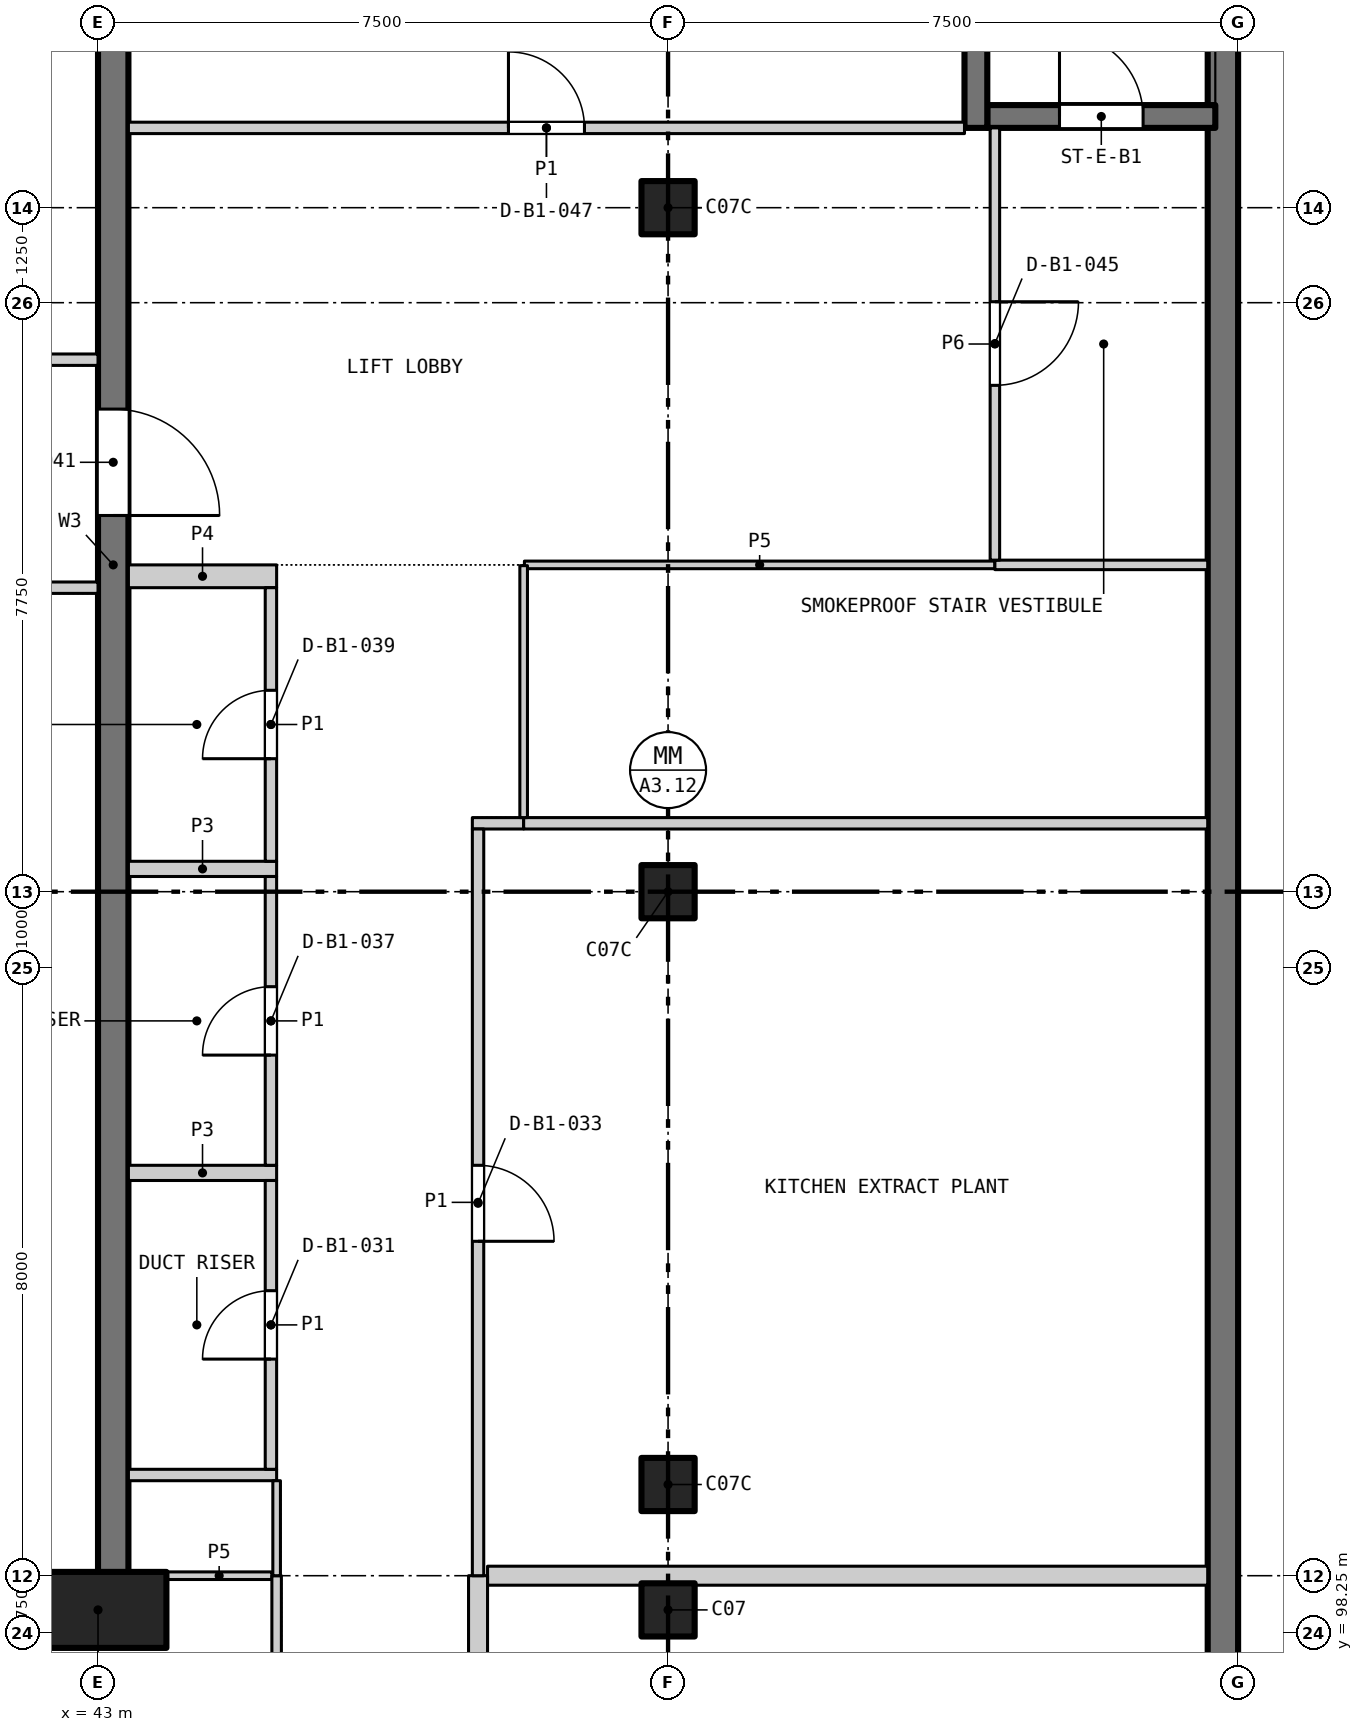
"""IFC4 building model, lengths in metres.
Left out: names, types, materials, properties, quantities, classifications, styles, units other than length and angle.
Written with IfcOpenShell. Run it as: python <this file> out.ifc"""

import sys

from ifc_helpers import new_model, si_unit, direction, frame, frame_2d, origin, origin_2d, place, context, subcontext, project, spatial, rectangle, extrude, element, fill, save


model = new_model("IFC4")
c1 = context("Model", 3, precision=1e-05, world=origin(), true_north=direction((0.0, 1.0)))
c2 = subcontext(c1, "Body", "Model", "MODEL_VIEW")
j1 = project(units=[si_unit("LENGTHUNIT", "METRE"), si_unit("PLANEANGLEUNIT", "RADIAN")], contexts=[c1])
p1 = place(None, origin())
s1 = spatial("IfcSite", under=j1, at=p1, CompositionType="ELEMENT")
p2 = place(p1, origin())
s2 = spatial("IfcBuilding", under=s1, at=p2, CompositionType="ELEMENT")
p3 = place(p2, frame((0.0, 0.0, -10.0)))
s3 = spatial("IfcBuildingStorey", under=s2, at=p3, CompositionType="ELEMENT", Elevation=-10.0)
for number, where, z_axis, x_axis in (
    (1, (50.5, 98.55, -1.4), (0.0, 0.0, 1.0), (1.0, 0.0, 0.0)),
    (2, (50.5, 100.2, -1.4), (0.0, 0.0, 1.0), (1.0, 0.0, 0.0)),
    (3, (50.5, 108.0, -1.4), (0.0, 0.0, 1.0), (1.0, 0.0, 0.0)),
    (4, (50.5, 117.0, -1.4), (0.0, 0.0, 1.0), (1.0, 0.0, 0.0)),
):
    element("IfcColumn", number, at=place(p3, frame(where, z_axis=z_axis, x_axis=x_axis)), inside=s3, PredefinedType="COLUMN", context=c2, shape_type="SweptSolid", body=[
        extrude(rectangle(XDim=0.7, YDim=0.7, at=origin_2d()), origin(), (0.0, 0.0, 1.0), 6.4),
    ])
p4 = place(p3, frame((57.8, 18.0, -1.4), z_axis=(0.0, 0.0, 1.0), x_axis=(0.0, 1.0, 0.0)))
e5 = element("IfcWall", 5, at=p4, inside=s3, PredefinedType="SOLIDWALL", context=c2, shape_type="SweptSolid", body=[
    extrude(rectangle(XDim=108.0, YDim=0.4, at=frame_2d((54.0, 0.0))), origin(), (0.0, 0.0, 1.0), 6.4),
])
p5 = place(p3, frame((43.2, 99.0, -1.4), z_axis=(0.0, 0.0, 1.0), x_axis=(0.0, 1.0, 0.0)))
e6 = element("IfcWall", 6, at=p5, inside=s3, PredefinedType="SHEAR", context=c2, shape_type="SweptSolid", body=[
    extrude(rectangle(XDim=26.6, YDim=0.4, at=frame_2d((13.3, 0.0))), origin(), (0.0, 0.0, 1.0), 6.4),
])
p6 = place(p5, frame((13.95, 0.0, 1.4)))
e7 = element("IfcOpeningElement", 7, at=p6, cuts=e6, PredefinedType="OPENING", context=c2, shape_type="SweptSolid", body=[
    extrude(rectangle(XDim=1.4, YDim=2.4, at=frame_2d((0.7, 1.2))), frame((0.0, 0.21, 0.0), z_axis=(0.0, -1.0, 0.0), x_axis=(1.0, 0.0, 0.0)), (0.0, 0.0, 1.0), 0.42),
])
p7 = place(p3, frame((54.7, 118.2, 0.0), z_axis=(0.0, 0.0, 1.0), x_axis=(1.0, 0.0, 0.0)))
e8 = element("IfcWall", 8, at=p7, inside=s3, PredefinedType="SHEAR", context=c2, shape_type="SweptSolid", body=[
    extrude(rectangle(XDim=3.0, YDim=0.3, at=frame_2d((1.5, 0.0))), origin(), (0.0, 0.0, 1.0), 5.0),
])
p8 = place(p7, frame((0.95, 0.0, 0.0)))
e9 = element("IfcOpeningElement", 9, at=p8, cuts=e8, PredefinedType="OPENING", context=c2, shape_type="SweptSolid", body=[
    extrude(rectangle(XDim=1.1, YDim=2.1, at=frame_2d((0.55, 1.05))), frame((0.0, 0.16, 0.0), z_axis=(0.0, -1.0, 0.0), x_axis=(1.0, 0.0, 0.0)), (0.0, 0.0, 1.0), 0.32),
])
p9 = place(p3, frame((54.55, 118.05, 0.0), z_axis=(0.0, 0.0, 1.0), x_axis=(0.0, 1.0, 0.0)))
e10 = element("IfcWall", 10, at=p9, inside=s3, PredefinedType="SHEAR", context=c2, shape_type="SweptSolid", body=[
    extrude(rectangle(XDim=7.5, YDim=0.3, at=frame_2d((3.75, 0.0))), origin(), (0.0, 0.0, 1.0), 5.0),
])
p10 = place(p3, frame((43.0, 98.55, -1.4), z_axis=(0.0, 0.0, 1.0), x_axis=(1.0, 0.0, 0.0)))
e11 = element("IfcColumn", 11, at=p10, inside=s3, PredefinedType="COLUMN", context=c2, shape_type="SweptSolid", body=[
    extrude(rectangle(XDim=1.8, YDim=1.0, at=origin_2d()), origin(), (0.0, 0.0, 1.0), 6.4),
])
p11 = place(p3, frame((43.4, 100.325, 0.0), z_axis=(0.0, 0.0, 1.0), x_axis=(1.0, 0.0, 0.0)))
e12 = element("IfcWall", 12, at=p11, inside=s3, PredefinedType="PARTITIONING", context=c2, shape_type="SweptSolid", body=[
    extrude(rectangle(XDim=1.95, YDim=0.15, at=frame_2d((0.975, 0.0))), origin(), (0.0, 0.0, 1.0), 4.75),
])
for number, where, z_axis, x_axis in (
    (13, (43.4, 104.3, 0.0), (0.0, 0.0, 1.0), (1.0, 0.0, 0.0)),
    (14, (43.4, 108.3, 0.0), (0.0, 0.0, 1.0), (1.0, 0.0, 0.0)),
):
    element("IfcWall", number, at=place(p3, frame(where, z_axis=z_axis, x_axis=x_axis)), inside=s3, PredefinedType="PARTITIONING", context=c2, shape_type="SweptSolid", body=[
        extrude(rectangle(XDim=1.95, YDim=0.2, at=frame_2d((0.975, 0.0))), origin(), (0.0, 0.0, 1.0), 4.75),
    ])
p12 = place(p3, frame((43.4, 112.15, 0.0), z_axis=(0.0, 0.0, 1.0), x_axis=(1.0, 0.0, 0.0)))
e15 = element("IfcWall", 15, at=p12, inside=s3, PredefinedType="PARTITIONING", context=c2, shape_type="SweptSolid", body=[
    extrude(rectangle(XDim=1.95, YDim=0.3, at=frame_2d((0.975, 0.0))), origin(), (0.0, 0.0, 1.0), 4.75),
])
p13 = place(p3, frame((45.275, 100.4, 0.0), z_axis=(0.0, 0.0, 1.0), x_axis=(0.0, 1.0, 0.0)))
e16 = element("IfcWall", 16, at=p13, inside=s3, PredefinedType="PARTITIONING", context=c2, shape_type="SweptSolid", body=[
    extrude(rectangle(XDim=3.8, YDim=0.15, at=frame_2d((1.9, 0.0))), origin(), (0.0, 0.0, 1.0), 4.75),
])
p14 = place(p13, frame((1.45, 0.0, 0.0)))
e17 = element("IfcOpeningElement", 17, at=p14, cuts=e16, PredefinedType="OPENING", context=c2, shape_type="SweptSolid", body=[
    extrude(rectangle(XDim=0.9, YDim=2.1, at=frame_2d((0.45, 1.05))), frame((0.0, 0.085, 0.0), z_axis=(0.0, -1.0, 0.0), x_axis=(1.0, 0.0, 0.0)), (0.0, 0.0, 1.0), 0.17),
])
p15 = place(p3, frame((45.275, 104.4, 0.0), z_axis=(0.0, 0.0, 1.0), x_axis=(0.0, 1.0, 0.0)))
e18 = element("IfcWall", 18, at=p15, inside=s3, PredefinedType="PARTITIONING", context=c2, shape_type="SweptSolid", body=[
    extrude(rectangle(XDim=3.8, YDim=0.15, at=frame_2d((1.9, 0.0))), origin(), (0.0, 0.0, 1.0), 4.75),
])
p16 = place(p15, frame((1.45, 0.0, 0.0)))
e19 = element("IfcOpeningElement", 19, at=p16, cuts=e18, PredefinedType="OPENING", context=c2, shape_type="SweptSolid", body=[
    extrude(rectangle(XDim=0.9, YDim=2.1, at=frame_2d((0.45, 1.05))), frame((0.0, 0.085, 0.0), z_axis=(0.0, -1.0, 0.0), x_axis=(1.0, 0.0, 0.0)), (0.0, 0.0, 1.0), 0.17),
])
p17 = place(p3, frame((45.275, 108.4, 0.0), z_axis=(0.0, 0.0, 1.0), x_axis=(0.0, 1.0, 0.0)))
e20 = element("IfcWall", 20, at=p17, inside=s3, PredefinedType="PARTITIONING", context=c2, shape_type="SweptSolid", body=[
    extrude(rectangle(XDim=3.6, YDim=0.15, at=frame_2d((1.8, 0.0))), origin(), (0.0, 0.0, 1.0), 4.75),
])
p18 = place(p17, frame((1.35, 0.0, 0.0)))
e21 = element("IfcOpeningElement", 21, at=p18, cuts=e20, PredefinedType="OPENING", context=c2, shape_type="SweptSolid", body=[
    extrude(rectangle(XDim=0.9, YDim=2.1, at=frame_2d((0.45, 1.05))), frame((0.0, 0.085, 0.0), z_axis=(0.0, -1.0, 0.0), x_axis=(1.0, 0.0, 0.0)), (0.0, 0.0, 1.0), 0.17),
])
p19 = place(p3, frame((43.9, 99.0, 0.0), z_axis=(0.0, 0.0, 1.0), x_axis=(1.0, 0.0, 0.0)))
e22 = element("IfcWall", 22, at=p19, inside=s3, PredefinedType="PARTITIONING", context=c2, shape_type="SweptSolid", body=[
    extrude(rectangle(XDim=1.388, YDim=0.1, at=frame_2d((0.694, 0.0))), origin(), (0.0, 0.0, 1.0), 4.75),
])
p20 = place(p3, frame((48.125, 99.0, 0.0), z_axis=(0.0, 0.0, 1.0), x_axis=(1.0, 0.0, 0.0)))
e23 = element("IfcWall", 23, at=p20, inside=s3, PredefinedType="PARTITIONING", context=c2, shape_type="SweptSolid", body=[
    extrude(rectangle(XDim=9.475, YDim=0.25, at=frame_2d((4.738, 0.0))), origin(), (0.0, 0.0, 1.0), 4.75),
])
p21 = place(p3, frame((47.925, 108.9, 0.0), z_axis=(0.0, 0.0, 1.0), x_axis=(1.0, 0.0, 0.0)))
e24 = element("IfcWall", 24, at=p21, inside=s3, PredefinedType="PARTITIONING", context=c2, shape_type="SweptSolid", body=[
    extrude(rectangle(XDim=0.675, YDim=0.15, at=frame_2d((0.337, 0.0))), origin(), (0.0, 0.0, 1.0), 4.75),
])
p22 = place(p3, frame((48.6, 108.9, 0.0), z_axis=(0.0, 0.0, 1.0), x_axis=(1.0, 0.0, 0.0)))
e25 = element("IfcWall", 25, at=p22, inside=s3, PredefinedType="PARTITIONING", context=c2, shape_type="SweptSolid", body=[
    extrude(rectangle(XDim=9.0, YDim=0.15, at=frame_2d((4.5, 0.0))), origin(), (0.0, 0.0, 1.0), 4.75),
])
p23 = place(p3, frame((33.51, 112.0, 0.0), z_axis=(0.0, 0.0, 1.0), x_axis=(1.0, 0.0, 0.0)))
e26 = element("IfcWall", 26, at=p23, inside=s3, PredefinedType="PARTITIONING", context=c2, shape_type="SweptSolid", body=[
    extrude(rectangle(XDim=9.49, YDim=0.15, at=frame_2d((4.745, 0.0))), origin(), (0.0, 0.0, 1.0), 4.75),
])
p24 = place(p3, frame((48.61, 112.3, 0.0), z_axis=(0.0, 0.0, 1.0), x_axis=(1.0, 0.0, 0.0)))
e27 = element("IfcWall", 27, at=p24, inside=s3, PredefinedType="PARTITIONING", context=c2, shape_type="SweptSolid", body=[
    extrude(rectangle(XDim=6.19, YDim=0.1, at=frame_2d((3.095, 0.0))), origin(), (0.0, 0.0, 1.0), 4.75),
])
p25 = place(p3, frame((54.8, 112.3, 0.0), z_axis=(0.0, 0.0, 1.0), x_axis=(1.0, 0.0, 0.0)))
e28 = element("IfcWall", 28, at=p25, inside=s3, PredefinedType="PARTITIONING", context=c2, shape_type="SweptSolid", body=[
    extrude(rectangle(XDim=2.8, YDim=0.125, at=frame_2d((1.4, 0.0))), origin(), (0.0, 0.0, 1.0), 4.75),
])
p26 = place(p3, frame((29.0, 115.0, 0.0), z_axis=(0.0, 0.0, 1.0), x_axis=(1.0, 0.0, 0.0)))
e29 = element("IfcWall", 29, at=p26, inside=s3, PredefinedType="PARTITIONING", context=c2, shape_type="SweptSolid", body=[
    extrude(rectangle(XDim=14.0, YDim=0.15, at=frame_2d((7.0, 0.0))), origin(), (0.0, 0.0, 1.0), 4.75),
])
p27 = place(p26, frame((6.0, 0.0, 0.0)))
e30 = element("IfcOpeningElement", 30, at=p27, cuts=e29, PredefinedType="OPENING", context=c2, shape_type="SweptSolid", body=[
    extrude(rectangle(XDim=2.0, YDim=2.4, at=frame_2d((1.0, 1.2))), frame((0.0, 0.085, 0.0), z_axis=(0.0, -1.0, 0.0), x_axis=(1.0, 0.0, 0.0)), (0.0, 0.0, 1.0), 0.17),
])
p28 = place(p3, frame((43.4, 118.05, 0.0), z_axis=(0.0, 0.0, 1.0), x_axis=(1.0, 0.0, 0.0)))
e31 = element("IfcWall", 31, at=p28, inside=s3, PredefinedType="PARTITIONING", context=c2, shape_type="SweptSolid", body=[
    extrude(rectangle(XDim=11.0, YDim=0.15, at=frame_2d((5.5, 0.0))), origin(), (0.0, 0.0, 1.0), 4.75),
])
p29 = place(p28, frame((5.0, 0.0, 0.0)))
e32 = element("IfcOpeningElement", 32, at=p29, cuts=e31, PredefinedType="OPENING", context=c2, shape_type="SweptSolid", body=[
    extrude(rectangle(XDim=1.0, YDim=2.1, at=frame_2d((0.5, 1.05))), frame((0.0, 0.085, 0.0), z_axis=(0.0, -1.0, 0.0), x_axis=(1.0, 0.0, 0.0)), (0.0, 0.0, 1.0), 0.17),
])
p30 = place(p3, frame((45.35, 85.5, 0.0), z_axis=(0.0, 0.0, 1.0), x_axis=(0.0, 1.0, 0.0)))
e33 = element("IfcWall", 33, at=p30, inside=s3, PredefinedType="PARTITIONING", context=c2, shape_type="SweptSolid", body=[
    extrude(rectangle(XDim=13.5, YDim=0.125, at=frame_2d((6.75, 0.0))), origin(), (0.0, 0.0, 1.0), 4.75),
])
p31 = place(p3, frame((45.35, 99.0, 0.0), z_axis=(0.0, 0.0, 1.0), x_axis=(0.0, 1.0, 0.0)))
e34 = element("IfcWall", 34, at=p31, inside=s3, PredefinedType="PARTITIONING", context=c2, shape_type="SweptSolid", body=[
    extrude(rectangle(XDim=1.25, YDim=0.1, at=frame_2d((0.625, 0.0))), origin(), (0.0, 0.0, 1.0), 4.75),
])
p32 = place(p3, frame((48.0, 72.0, 0.0), z_axis=(0.0, 0.0, 1.0), x_axis=(0.0, 1.0, 0.0)))
e35 = element("IfcWall", 35, at=p32, inside=s3, PredefinedType="PARTITIONING", context=c2, shape_type="SweptSolid", body=[
    extrude(rectangle(XDim=27.0, YDim=0.25, at=frame_2d((13.5, 0.0))), origin(), (0.0, 0.0, 1.0), 4.75),
])
p33 = place(p32, frame((12.4, 0.0, 0.0)))
e36 = element("IfcOpeningElement", 36, at=p33, cuts=e35, PredefinedType="OPENING", context=c2, shape_type="SweptSolid", body=[
    extrude(rectangle(XDim=2.2, YDim=2.4, at=frame_2d((1.1, 1.2))), frame((0.0, 0.135, 0.0), z_axis=(0.0, -1.0, 0.0), x_axis=(1.0, 0.0, 0.0)), (0.0, 0.0, 1.0), 0.27),
])
p34 = place(p3, frame((48.0, 99.0, 0.0), z_axis=(0.0, 0.0, 1.0), x_axis=(0.0, 1.0, 0.0)))
e37 = element("IfcWall", 37, at=p34, inside=s3, PredefinedType="PARTITIONING", context=c2, shape_type="SweptSolid", body=[
    extrude(rectangle(XDim=9.825, YDim=0.15, at=frame_2d((4.913, 0.0))), origin(), (0.0, 0.0, 1.0), 4.75),
])
p35 = place(p34, frame((4.4, 0.0, 0.0)))
e38 = element("IfcOpeningElement", 38, at=p35, cuts=e37, PredefinedType="OPENING", context=c2, shape_type="SweptSolid", body=[
    extrude(rectangle(XDim=1.0, YDim=2.1, at=frame_2d((0.5, 1.05))), frame((0.0, 0.085, 0.0), z_axis=(0.0, -1.0, 0.0), x_axis=(1.0, 0.0, 0.0)), (0.0, 0.0, 1.0), 0.17),
])
p36 = place(p3, frame((48.6, 108.975, 0.0), z_axis=(0.0, 0.0, 1.0), x_axis=(0.0, 1.0, 0.0)))
e39 = element("IfcWall", 39, at=p36, inside=s3, PredefinedType="PARTITIONING", context=c2, shape_type="SweptSolid", body=[
    extrude(rectangle(XDim=3.315, YDim=0.1, at=frame_2d((1.657, 0.0))), origin(), (0.0, 0.0, 1.0), 4.75),
])
p37 = place(p3, frame((54.8, 112.363, 0.0), z_axis=(0.0, 0.0, 1.0), x_axis=(0.0, 1.0, 0.0)))
e40 = element("IfcWall", 40, at=p37, inside=s3, PredefinedType="PARTITIONING", context=c2, shape_type="SweptSolid", body=[
    extrude(rectangle(XDim=5.688, YDim=0.125, at=frame_2d((2.844, 0.0))), origin(), (0.0, 0.0, 1.0), 4.75),
])
p38 = place(p37, frame((2.3, 0.0, 0.0)))
e41 = element("IfcOpeningElement", 41, at=p38, cuts=e40, PredefinedType="OPENING", context=c2, shape_type="SweptSolid", body=[
    extrude(rectangle(XDim=1.1, YDim=2.1, at=frame_2d((0.55, 1.05))), frame((0.0, 0.073, 0.0), z_axis=(0.0, -1.0, 0.0), x_axis=(1.0, 0.0, 0.0)), (0.0, 0.0, 1.0), 0.145),
])
p39 = place(p14, origin())
e42 = element("IfcDoor", 42, at=p39, inside=s3, OperationType="SINGLE_SWING_LEFT", PredefinedType="DOOR", context=c2, shape_type="SweptSolid", body=[
    extrude(rectangle(XDim=0.9, YDim=2.1, at=frame_2d((0.45, 1.05))), frame((0.0, 0.025, 0.0), z_axis=(0.0, -1.0, 0.0), x_axis=(1.0, 0.0, 0.0)), (0.0, 0.0, 1.0), 0.05),
])
fill(e17, e42)
p40 = place(p35, frame((1.0, 0.0, 0.0), z_axis=(0.0, 0.0, 1.0), x_axis=(-1.0, 0.0, 0.0)))
e43 = element("IfcDoor", 43, at=p40, inside=s3, OperationType="SINGLE_SWING_RIGHT", PredefinedType="DOOR", context=c2, shape_type="SweptSolid", body=[
    extrude(rectangle(XDim=1.0, YDim=2.1, at=frame_2d((0.5, 1.05))), frame((0.0, 0.025, 0.0), z_axis=(0.0, -1.0, 0.0), x_axis=(1.0, 0.0, 0.0)), (0.0, 0.0, 1.0), 0.05),
])
fill(e38, e43)
p41 = place(p16, origin())
e44 = element("IfcDoor", 44, at=p41, inside=s3, OperationType="SINGLE_SWING_LEFT", PredefinedType="DOOR", context=c2, shape_type="SweptSolid", body=[
    extrude(rectangle(XDim=0.9, YDim=2.1, at=frame_2d((0.45, 1.05))), frame((0.0, 0.025, 0.0), z_axis=(0.0, -1.0, 0.0), x_axis=(1.0, 0.0, 0.0)), (0.0, 0.0, 1.0), 0.05),
])
fill(e19, e44)
p42 = place(p18, origin())
e45 = element("IfcDoor", 45, at=p42, inside=s3, OperationType="SINGLE_SWING_LEFT", PredefinedType="DOOR", context=c2, shape_type="SweptSolid", body=[
    extrude(rectangle(XDim=0.9, YDim=2.1, at=frame_2d((0.45, 1.05))), frame((0.0, 0.025, 0.0), z_axis=(0.0, -1.0, 0.0), x_axis=(1.0, 0.0, 0.0)), (0.0, 0.0, 1.0), 0.05),
])
fill(e21, e45)
p43 = place(p6, frame((1.4, 0.0, 0.0), z_axis=(0.0, 0.0, 1.0), x_axis=(-1.0, 0.0, 0.0)))
e46 = element("IfcDoor", 46, at=p43, inside=s3, OperationType="SINGLE_SWING_RIGHT", PredefinedType="DOOR", context=c2, shape_type="SweptSolid", body=[
    extrude(rectangle(XDim=1.4, YDim=2.4, at=frame_2d((0.7, 1.2))), frame((0.0, 0.025, 0.0), z_axis=(0.0, -1.0, 0.0), x_axis=(1.0, 0.0, 0.0)), (0.0, 0.0, 1.0), 0.05),
])
fill(e7, e46)
p44 = place(p38, frame((1.1, 0.0, 0.0), z_axis=(0.0, 0.0, 1.0), x_axis=(-1.0, 0.0, 0.0)))
e47 = element("IfcDoor", 47, at=p44, inside=s3, OperationType="SINGLE_SWING_LEFT", PredefinedType="DOOR", context=c2, shape_type="SweptSolid", body=[
    extrude(rectangle(XDim=1.1, YDim=2.1, at=frame_2d((0.55, 1.05))), frame((0.0, 0.025, 0.0), z_axis=(0.0, -1.0, 0.0), x_axis=(1.0, 0.0, 0.0)), (0.0, 0.0, 1.0), 0.05),
])
fill(e41, e47)
p45 = place(p29, origin())
e48 = element("IfcDoor", 48, at=p45, inside=s3, OperationType="SINGLE_SWING_LEFT", PredefinedType="DOOR", context=c2, shape_type="SweptSolid", body=[
    extrude(rectangle(XDim=1.0, YDim=2.1, at=frame_2d((0.5, 1.05))), frame((0.0, 0.025, 0.0), z_axis=(0.0, -1.0, 0.0), x_axis=(1.0, 0.0, 0.0)), (0.0, 0.0, 1.0), 0.05),
])
fill(e32, e48)
p46 = place(p8, origin())
e49 = element("IfcDoor", 49, at=p46, inside=s3, OperationType="SINGLE_SWING_LEFT", PredefinedType="DOOR", context=c2, shape_type="SweptSolid", body=[
    extrude(rectangle(XDim=1.1, YDim=2.1, at=frame_2d((0.55, 1.05))), frame((0.0, 0.025, 0.0), z_axis=(0.0, -1.0, 0.0), x_axis=(1.0, 0.0, 0.0)), (0.0, 0.0, 1.0), 0.05),
])
fill(e9, e49)
save(model, sys.argv[1])
